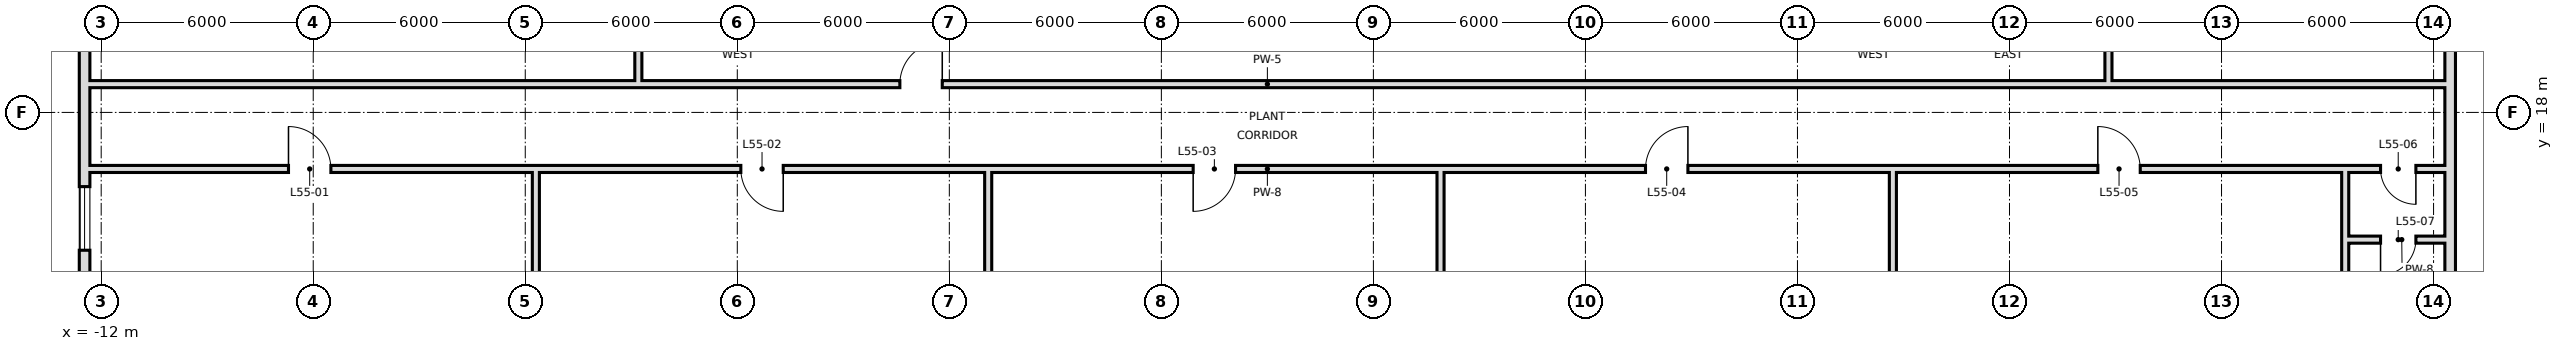
"""IFC4 building model, lengths in metres.
Left out: names, types, materials, properties, quantities, classifications, styles, units other than length and angle.
Written with IfcOpenShell. Run it as: python <this file> out.ifc"""

import sys

from ifc_helpers import new_model, si_unit, direction, frame, frame_2d, origin, place, context, subcontext, project, spatial, rectangle, extrude, element, fill, save


model = new_model("IFC4")
c1 = context("Model", 3, precision=1e-05, world=origin(), true_north=direction((0.0, 1.0)))
c2 = subcontext(c1, "Body", "Model", "MODEL_VIEW")
j1 = project(units=[si_unit("LENGTHUNIT", "METRE"), si_unit("PLANEANGLEUNIT", "RADIAN")], contexts=[c1])
p1 = place(None, origin())
s1 = spatial("IfcSite", under=j1, at=p1, CompositionType="ELEMENT")
p2 = place(p1, origin())
s2 = spatial("IfcBuilding", under=s1, at=p2, CompositionType="ELEMENT")
p3 = place(p2, frame((0.0, 0.0, 234.2)))
s3 = spatial("IfcBuildingStorey", under=s2, at=p3, CompositionType="ELEMENT", Elevation=234.2)
p4 = place(p3, frame((54.47, 5.805, 0.0), z_axis=(0.0, 0.0, 1.0), x_axis=(0.0, 1.0, 0.0)))
e1 = element("IfcWall", 1, at=p4, inside=s3, PredefinedType="SOLIDWALL", context=c2, shape_type="SweptSolid", body=[
    extrude(rectangle(XDim=36.389, YDim=0.3, at=frame_2d((18.195, 0.0))), origin(), (0.0, 0.0, 1.0), 5.22),
])
p5 = place(p4, frame((2.17, 0.0, 0.9)))
e2 = element("IfcOpeningElement", 2, at=p5, cuts=e1, PredefinedType="OPENING", context=c2, shape_type="SweptSolid", body=[
    extrude(rectangle(XDim=1.8, YDim=1.5, at=frame_2d((0.9, 0.75))), frame((0.0, 0.16, 0.0), z_axis=(0.0, -1.0, 0.0), x_axis=(1.0, 0.0, 0.0)), (0.0, 0.0, 1.0), 0.32),
])
p6 = place(p4, frame((14.295, 0.0, 0.9)))
e3 = element("IfcOpeningElement", 3, at=p6, cuts=e1, PredefinedType="OPENING", context=c2, shape_type="SweptSolid", body=[
    extrude(rectangle(XDim=1.8, YDim=1.5, at=frame_2d((0.9, 0.75))), frame((0.0, 0.16, 0.0), z_axis=(0.0, -1.0, 0.0), x_axis=(1.0, 0.0, 0.0)), (0.0, 0.0, 1.0), 0.32),
])
p7 = place(p4, frame((26.295, 0.0, 0.9)))
e4 = element("IfcOpeningElement", 4, at=p7, cuts=e1, PredefinedType="OPENING", context=c2, shape_type="SweptSolid", body=[
    extrude(rectangle(XDim=1.8, YDim=1.5, at=frame_2d((0.9, 0.75))), frame((0.0, 0.16, 0.0), z_axis=(0.0, -1.0, 0.0), x_axis=(1.0, 0.0, 0.0)), (0.0, 0.0, 1.0), 0.32),
])
p8 = place(p3, frame((-12.47, 42.195, 0.0), z_axis=(0.0, 0.0, 1.0), x_axis=(0.0, -1.0, 0.0)))
e5 = element("IfcWall", 5, at=p8, inside=s3, PredefinedType="SOLIDWALL", context=c2, shape_type="SweptSolid", body=[
    extrude(rectangle(XDim=36.389, YDim=0.3, at=frame_2d((18.195, 0.0))), origin(), (0.0, 0.0, 1.0), 5.22),
])
p9 = place(p8, frame((2.17, 0.0, 0.9)))
e6 = element("IfcOpeningElement", 6, at=p9, cuts=e5, PredefinedType="OPENING", context=c2, shape_type="SweptSolid", body=[
    extrude(rectangle(XDim=1.8, YDim=1.5, at=frame_2d((0.9, 0.75))), frame((0.0, 0.16, 0.0), z_axis=(0.0, -1.0, 0.0), x_axis=(1.0, 0.0, 0.0)), (0.0, 0.0, 1.0), 0.32),
])
p10 = place(p8, frame((14.295, 0.0, 0.9)))
e7 = element("IfcOpeningElement", 7, at=p10, cuts=e5, PredefinedType="OPENING", context=c2, shape_type="SweptSolid", body=[
    extrude(rectangle(XDim=1.8, YDim=1.5, at=frame_2d((0.9, 0.75))), frame((0.0, 0.16, 0.0), z_axis=(0.0, -1.0, 0.0), x_axis=(1.0, 0.0, 0.0)), (0.0, 0.0, 1.0), 0.32),
])
p11 = place(p8, frame((26.295, 0.0, 0.9)))
e8 = element("IfcOpeningElement", 8, at=p11, cuts=e5, PredefinedType="OPENING", context=c2, shape_type="SweptSolid", body=[
    extrude(rectangle(XDim=1.8, YDim=1.5, at=frame_2d((0.9, 0.75))), frame((0.0, 0.16, 0.0), z_axis=(0.0, -1.0, 0.0), x_axis=(1.0, 0.0, 0.0)), (0.0, 0.0, 1.0), 0.32),
])
p12 = place(p3, frame((0.3, -0.5, 0.0), z_axis=(0.0, 0.0, 1.0), x_axis=(0.0, 1.0, 0.0)))
e9 = element("IfcWall", 9, at=p12, inside=s3, PredefinedType="SOLIDWALL", context=c2, shape_type="SweptSolid", body=[
    extrude(rectangle(XDim=16.8, YDim=0.2, at=frame_2d((8.4, 0.0))), origin(), (0.0, 0.0, 1.0), 5.22),
])
p13 = place(p3, frame((3.2, 18.9, 0.0), z_axis=(0.0, 0.0, 1.0), x_axis=(0.0, 1.0, 0.0)))
e10 = element("IfcWall", 10, at=p13, inside=s3, PredefinedType="SOLIDWALL", context=c2, shape_type="SweptSolid", body=[
    extrude(rectangle(XDim=29.7, YDim=0.2, at=frame_2d((14.85, 0.0))), origin(), (0.0, 0.0, 1.0), 4.52),
])
p14 = place(p13, frame((18.3, 0.0, 0.0)))
e11 = element("IfcOpeningElement", 11, at=p14, cuts=e10, PredefinedType="OPENING", context=c2, shape_type="SweptSolid", body=[
    extrude(rectangle(XDim=1.2, YDim=2.4, at=frame_2d((0.6, 1.2))), frame((0.0, 0.11, 0.0), z_axis=(0.0, -1.0, 0.0), x_axis=(1.0, 0.0, 0.0)), (0.0, 0.0, 1.0), 0.22),
])
for number, where, z_axis, x_axis in (
    (12, (13.1, -0.6, 0.0), (0.0, 0.0, 1.0), (0.0, 1.0, 0.0)),
    (13, (25.9, -0.6, 0.0), (0.0, 0.0, 1.0), (0.0, 1.0, 0.0)),
    (14, (38.7, -0.6, 0.0), (0.0, 0.0, 1.0), (0.0, 1.0, 0.0)),
):
    element("IfcWall", number, at=place(p3, frame(where, z_axis=z_axis, x_axis=x_axis)), inside=s3, PredefinedType="SOLIDWALL", context=c2, shape_type="SweptSolid", body=[
        extrude(rectangle(XDim=16.9, YDim=0.2, at=frame_2d((8.45, 0.0))), origin(), (0.0, 0.0, 1.0), 4.52),
    ])
p15 = place(p3, frame((44.8, 18.9, 0.0), z_axis=(0.0, 0.0, 1.0), x_axis=(0.0, 1.0, 0.0)))
e15 = element("IfcWall", 15, at=p15, inside=s3, PredefinedType="SOLIDWALL", context=c2, shape_type="SweptSolid", body=[
    extrude(rectangle(XDim=29.7, YDim=0.2, at=frame_2d((14.85, 0.0))), origin(), (0.0, 0.0, 1.0), 4.52),
])
p16 = place(p15, frame((18.3, 0.0, 0.0)))
e16 = element("IfcOpeningElement", 16, at=p16, cuts=e15, PredefinedType="OPENING", context=c2, shape_type="SweptSolid", body=[
    extrude(rectangle(XDim=1.2, YDim=2.4, at=frame_2d((0.6, 1.2))), frame((0.0, 0.11, 0.0), z_axis=(0.0, -1.0, 0.0), x_axis=(1.0, 0.0, 0.0)), (0.0, 0.0, 1.0), 0.22),
])
p17 = place(p3, frame((51.5, 2.651, 0.0), z_axis=(0.0, 0.0, 1.0), x_axis=(0.0, 1.0, 0.0)))
e17 = element("IfcWall", 17, at=p17, inside=s3, PredefinedType="SOLIDWALL", context=c2, shape_type="SweptSolid", body=[
    extrude(rectangle(XDim=13.649, YDim=0.2, at=frame_2d((6.825, 0.0))), origin(), (0.0, 0.0, 1.0), 4.77),
])
p18 = place(p3, frame((51.6, 14.4, 0.0), z_axis=(0.0, 0.0, 1.0), x_axis=(1.0, 0.0, 0.0)))
e18 = element("IfcWall", 18, at=p18, inside=s3, PredefinedType="SOLIDWALL", context=c2, shape_type="SweptSolid", body=[
    extrude(rectangle(XDim=3.0, YDim=0.2, at=frame_2d((1.5, 0.0))), origin(), (0.0, 0.0, 1.0), 4.52),
])
p19 = place(p18, frame((0.9, 0.0, 0.0)))
e19 = element("IfcOpeningElement", 19, at=p19, cuts=e18, PredefinedType="OPENING", context=c2, shape_type="SweptSolid", body=[
    extrude(rectangle(XDim=1.0, YDim=2.4, at=frame_2d((0.5, 1.2))), frame((0.0, 0.11, 0.0), z_axis=(0.0, -1.0, 0.0), x_axis=(1.0, 0.0, 0.0)), (0.0, 0.0, 1.0), 0.22),
])
p20 = place(p3, frame((-12.6, 16.4, 0.0), z_axis=(0.0, 0.0, 1.0), x_axis=(1.0, 0.0, 0.0)))
e20 = element("IfcWall", 20, at=p20, inside=s3, PredefinedType="SOLIDWALL", context=c2, shape_type="SweptSolid", body=[
    extrude(rectangle(XDim=67.2, YDim=0.2, at=frame_2d((33.6, 0.0))), origin(), (0.0, 0.0, 1.0), 4.52),
])
p21 = place(p20, frame((5.9, 0.0, 0.0)))
e21 = element("IfcOpeningElement", 21, at=p21, cuts=e20, PredefinedType="OPENING", context=c2, shape_type="SweptSolid", body=[
    extrude(rectangle(XDim=1.2, YDim=2.4, at=frame_2d((0.6, 1.2))), frame((0.0, 0.11, 0.0), z_axis=(0.0, -1.0, 0.0), x_axis=(1.0, 0.0, 0.0)), (0.0, 0.0, 1.0), 0.22),
])
p22 = place(p20, frame((18.7, 0.0, 0.0)))
e22 = element("IfcOpeningElement", 22, at=p22, cuts=e20, PredefinedType="OPENING", context=c2, shape_type="SweptSolid", body=[
    extrude(rectangle(XDim=1.2, YDim=2.4, at=frame_2d((0.6, 1.2))), frame((0.0, 0.11, 0.0), z_axis=(0.0, -1.0, 0.0), x_axis=(1.0, 0.0, 0.0)), (0.0, 0.0, 1.0), 0.22),
])
p23 = place(p20, frame((31.5, 0.0, 0.0)))
e23 = element("IfcOpeningElement", 23, at=p23, cuts=e20, PredefinedType="OPENING", context=c2, shape_type="SweptSolid", body=[
    extrude(rectangle(XDim=1.2, YDim=2.4, at=frame_2d((0.6, 1.2))), frame((0.0, 0.11, 0.0), z_axis=(0.0, -1.0, 0.0), x_axis=(1.0, 0.0, 0.0)), (0.0, 0.0, 1.0), 0.22),
])
p24 = place(p20, frame((44.3, 0.0, 0.0)))
e24 = element("IfcOpeningElement", 24, at=p24, cuts=e20, PredefinedType="OPENING", context=c2, shape_type="SweptSolid", body=[
    extrude(rectangle(XDim=1.2, YDim=2.4, at=frame_2d((0.6, 1.2))), frame((0.0, 0.11, 0.0), z_axis=(0.0, -1.0, 0.0), x_axis=(1.0, 0.0, 0.0)), (0.0, 0.0, 1.0), 0.22),
])
p25 = place(p20, frame((57.1, 0.0, 0.0)))
e25 = element("IfcOpeningElement", 25, at=p25, cuts=e20, PredefinedType="OPENING", context=c2, shape_type="SweptSolid", body=[
    extrude(rectangle(XDim=1.2, YDim=2.4, at=frame_2d((0.6, 1.2))), frame((0.0, 0.11, 0.0), z_axis=(0.0, -1.0, 0.0), x_axis=(1.0, 0.0, 0.0)), (0.0, 0.0, 1.0), 0.22),
])
p26 = place(p20, frame((65.1, 0.0, 0.0)))
e26 = element("IfcOpeningElement", 26, at=p26, cuts=e20, PredefinedType="OPENING", context=c2, shape_type="SweptSolid", body=[
    extrude(rectangle(XDim=1.0, YDim=2.4, at=frame_2d((0.5, 1.2))), frame((0.0, 0.11, 0.0), z_axis=(0.0, -1.0, 0.0), x_axis=(1.0, 0.0, 0.0)), (0.0, 0.0, 1.0), 0.22),
])
p27 = place(p3, frame((-12.6, 18.8, 0.0), z_axis=(0.0, 0.0, 1.0), x_axis=(1.0, 0.0, 0.0)))
e27 = element("IfcWall", 27, at=p27, inside=s3, PredefinedType="SOLIDWALL", context=c2, shape_type="SweptSolid", body=[
    extrude(rectangle(XDim=67.2, YDim=0.2, at=frame_2d((33.6, 0.0))), origin(), (0.0, 0.0, 1.0), 4.52),
])
p28 = place(p27, frame((23.2, 0.0, 0.0)))
e28 = element("IfcOpeningElement", 28, at=p28, cuts=e27, PredefinedType="OPENING", context=c2, shape_type="SweptSolid", body=[
    extrude(rectangle(XDim=1.2, YDim=2.4, at=frame_2d((0.6, 1.2))), frame((0.0, 0.11, 0.0), z_axis=(0.0, -1.0, 0.0), x_axis=(1.0, 0.0, 0.0)), (0.0, 0.0, 1.0), 0.22),
])
p29 = place(p11, origin())
e29 = element("IfcWindow", 29, at=p29, inside=s3, PartitioningType="SINGLE_PANEL", PredefinedType="WINDOW", context=c2, shape_type="SweptSolid", body=[
    extrude(rectangle(XDim=1.8, YDim=1.5, at=frame_2d((0.9, 0.75))), frame((0.0, 0.03, 0.0), z_axis=(0.0, -1.0, 0.0), x_axis=(1.0, 0.0, 0.0)), (0.0, 0.0, 1.0), 0.06),
])
fill(e8, e29)
p30 = place(p21, origin())
e30 = element("IfcDoor", 30, at=p30, inside=s3, OperationType="SINGLE_SWING_LEFT", PredefinedType="DOOR", context=c2, shape_type="SweptSolid", body=[
    extrude(rectangle(XDim=1.2, YDim=2.4, at=frame_2d((0.6, 1.2))), frame((0.0, 0.025, 0.0), z_axis=(0.0, -1.0, 0.0), x_axis=(1.0, 0.0, 0.0)), (0.0, 0.0, 1.0), 0.05),
])
fill(e21, e30)
p31 = place(p22, origin())
e31 = element("IfcDoor", 31, at=p31, inside=s3, OperationType="SINGLE_SWING_RIGHT", PredefinedType="DOOR", context=c2, shape_type="SweptSolid", body=[
    extrude(rectangle(XDim=1.2, YDim=2.4, at=frame_2d((0.6, 1.2))), frame((0.0, 0.025, 0.0), z_axis=(0.0, -1.0, 0.0), x_axis=(1.0, 0.0, 0.0)), (0.0, 0.0, 1.0), 0.05),
])
fill(e22, e31)
p32 = place(p23, frame((1.2, 0.0, 0.0), z_axis=(0.0, 0.0, 1.0), x_axis=(-1.0, 0.0, 0.0)))
e32 = element("IfcDoor", 32, at=p32, inside=s3, OperationType="SINGLE_SWING_RIGHT", PredefinedType="DOOR", context=c2, shape_type="SweptSolid", body=[
    extrude(rectangle(XDim=1.2, YDim=2.4, at=frame_2d((0.6, 1.2))), frame((0.0, 0.025, 0.0), z_axis=(0.0, -1.0, 0.0), x_axis=(1.0, 0.0, 0.0)), (0.0, 0.0, 1.0), 0.05),
])
fill(e23, e32)
p33 = place(p24, frame((1.2, 0.0, 0.0), z_axis=(0.0, 0.0, 1.0), x_axis=(-1.0, 0.0, 0.0)))
e33 = element("IfcDoor", 33, at=p33, inside=s3, OperationType="SINGLE_SWING_LEFT", PredefinedType="DOOR", context=c2, shape_type="SweptSolid", body=[
    extrude(rectangle(XDim=1.2, YDim=2.4, at=frame_2d((0.6, 1.2))), frame((0.0, 0.025, 0.0), z_axis=(0.0, -1.0, 0.0), x_axis=(1.0, 0.0, 0.0)), (0.0, 0.0, 1.0), 0.05),
])
fill(e24, e33)
p34 = place(p25, origin())
e34 = element("IfcDoor", 34, at=p34, inside=s3, OperationType="SINGLE_SWING_LEFT", PredefinedType="DOOR", context=c2, shape_type="SweptSolid", body=[
    extrude(rectangle(XDim=1.2, YDim=2.4, at=frame_2d((0.6, 1.2))), frame((0.0, 0.025, 0.0), z_axis=(0.0, -1.0, 0.0), x_axis=(1.0, 0.0, 0.0)), (0.0, 0.0, 1.0), 0.05),
])
fill(e25, e34)
p35 = place(p26, origin())
e35 = element("IfcDoor", 35, at=p35, inside=s3, OperationType="SINGLE_SWING_RIGHT", PredefinedType="DOOR", context=c2, shape_type="SweptSolid", body=[
    extrude(rectangle(XDim=1.0, YDim=2.4, at=frame_2d((0.5, 1.2))), frame((0.0, 0.025, 0.0), z_axis=(0.0, -1.0, 0.0), x_axis=(1.0, 0.0, 0.0)), (0.0, 0.0, 1.0), 0.05),
])
fill(e26, e35)
p36 = place(p19, frame((1.0, 0.0, 0.0), z_axis=(0.0, 0.0, 1.0), x_axis=(-1.0, 0.0, 0.0)))
e36 = element("IfcDoor", 36, at=p36, inside=s3, OperationType="SINGLE_SWING_RIGHT", PredefinedType="DOOR", context=c2, shape_type="SweptSolid", body=[
    extrude(rectangle(XDim=1.0, YDim=2.4, at=frame_2d((0.5, 1.2))), frame((0.0, 0.025, 0.0), z_axis=(0.0, -1.0, 0.0), x_axis=(1.0, 0.0, 0.0)), (0.0, 0.0, 1.0), 0.05),
])
fill(e19, e36)
p37 = place(p28, frame((1.2, 0.0, 0.0), z_axis=(0.0, 0.0, 1.0), x_axis=(-1.0, 0.0, 0.0)))
e37 = element("IfcDoor", 37, at=p37, inside=s3, OperationType="SINGLE_SWING_LEFT", PredefinedType="DOOR", context=c2, shape_type="SweptSolid", body=[
    extrude(rectangle(XDim=1.2, YDim=2.4, at=frame_2d((0.6, 1.2))), frame((0.0, 0.025, 0.0), z_axis=(0.0, -1.0, 0.0), x_axis=(1.0, 0.0, 0.0)), (0.0, 0.0, 1.0), 0.05),
])
fill(e28, e37)
save(model, sys.argv[1])
